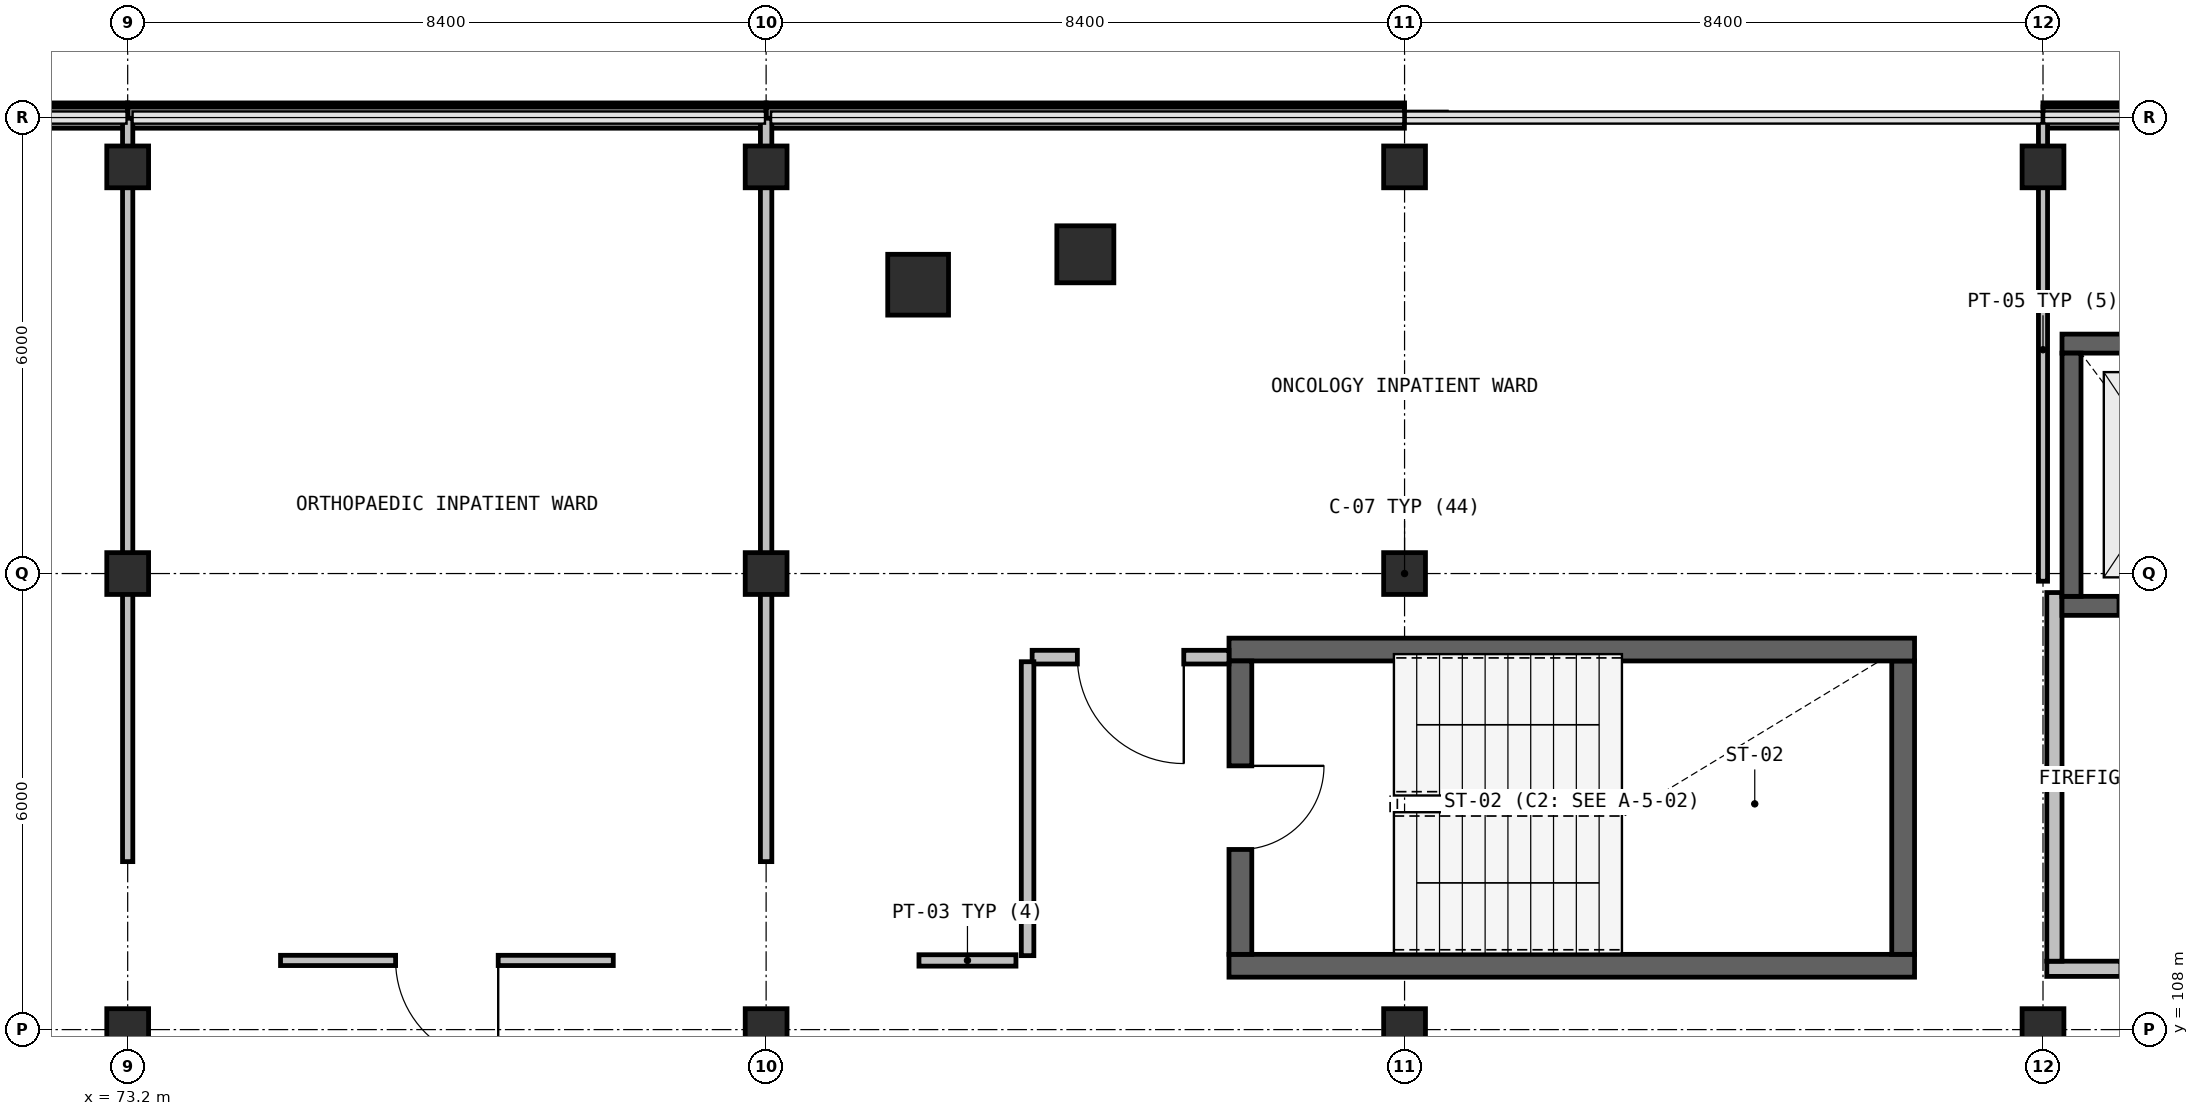
"""IFC4 building model, lengths in metres.
Left out: names, types, materials, properties, quantities, classifications, styles, units other than length and angle.
Written with IfcOpenShell. Run it as: python <this file> out.ifc"""

import sys

from ifc_helpers import new_model, si_unit, direction, frame, frame_2d, origin, origin_2d, place, context, subcontext, project, spatial, rectangle, extrude, element, fill, save


model = new_model("IFC4")
c1 = context("Model", 3, precision=1e-05, world=origin(), true_north=direction((0.0, 1.0)))
c2 = subcontext(c1, "Body", "Model", "MODEL_VIEW")
j1 = project(units=[si_unit("LENGTHUNIT", "METRE"), si_unit("PLANEANGLEUNIT", "RADIAN")], contexts=[c1])
p1 = place(None, origin())
s1 = spatial("IfcSite", under=j1, at=p1, CompositionType="ELEMENT")
p2 = place(p1, origin())
s2 = spatial("IfcBuilding", under=s1, at=p2, CompositionType="ELEMENT")
p3 = place(p2, frame((0.0, 0.0, 31.35)))
s3 = spatial("IfcBuildingStorey", under=s2, at=p3, CompositionType="ELEMENT", Elevation=31.35)
p4 = place(p3, frame((83.6, 117.8, 0.0), z_axis=(0.0, 0.0, 1.0), x_axis=(1.0, 0.0, 0.0)))
e1 = element("IfcColumn", 1, at=p4, inside=s3, PredefinedType="COLUMN", context=c2, shape_type="SweptSolid", body=[
    extrude(rectangle(XDim=0.8, YDim=0.8, at=origin_2d()), origin(), (0.0, 0.0, 1.0), 4.05),
])
p5 = place(p3, frame((85.8, 118.2, 0.0), z_axis=(0.0, 0.0, 1.0), x_axis=(1.0, 0.0, 0.0)))
e2 = element("IfcColumn", 2, at=p5, inside=s3, PredefinedType="COLUMN", context=c2, shape_type="SweptSolid", body=[
    extrude(rectangle(XDim=0.75, YDim=0.75, at=origin_2d()), origin(), (0.0, 0.0, 1.0), 4.05),
])
for number, where, z_axis, x_axis in (
    (3, (73.2, 108.0, 0.0), (0.0, 0.0, 1.0), (1.0, 0.0, 0.0)),
    (4, (73.2, 114.0, 0.0), (0.0, 0.0, 1.0), (1.0, 0.0, 0.0)),
    (5, (73.2, 119.35, 0.0), (0.0, 0.0, 1.0), (1.0, 0.0, 0.0)),
    (6, (81.6, 108.0, 0.0), (0.0, 0.0, 1.0), (1.0, 0.0, 0.0)),
    (7, (81.6, 114.0, 0.0), (0.0, 0.0, 1.0), (1.0, 0.0, 0.0)),
    (8, (81.6, 119.35, 0.0), (0.0, 0.0, 1.0), (1.0, 0.0, 0.0)),
    (9, (90.0, 108.0, 0.0), (0.0, 0.0, 1.0), (1.0, 0.0, 0.0)),
    (10, (90.0, 114.0, 0.0), (0.0, 0.0, 1.0), (1.0, 0.0, 0.0)),
    (11, (90.0, 119.35, 0.0), (0.0, 0.0, 1.0), (1.0, 0.0, 0.0)),
    (12, (98.4, 108.0, 0.0), (0.0, 0.0, 1.0), (1.0, 0.0, 0.0)),
    (13, (98.4, 119.35, 0.0), (0.0, 0.0, 1.0), (1.0, 0.0, 0.0)),
):
    element("IfcColumn", number, at=place(p3, frame(where, z_axis=z_axis, x_axis=x_axis)), inside=s3, PredefinedType="COLUMN", context=c2, shape_type="SweptSolid", body=[
        extrude(rectangle(XDim=0.55, YDim=0.55, at=origin_2d()), origin(), (0.0, 0.0, 1.0), 4.05),
    ])
for number, where, z_axis, x_axis in (
    (14, (64.802, 119.999, 0.0), (0.0, 0.0, 1.0), (1.0, 0.0, 0.0)),
    (15, (73.202, 119.999, 0.0), (0.0, 0.0, 1.0), (1.0, 0.0, 0.0)),
    (16, (81.602, 119.999, 0.0), (0.0, 0.0, 1.0), (1.0, 0.0, 0.0)),
):
    element("IfcWall", number, at=place(p3, frame(where, z_axis=z_axis, x_axis=x_axis)), inside=s3, PredefinedType="SOLIDWALL", context=c2, shape_type="SweptSolid", body=[
        extrude(rectangle(XDim=8.396, YDim=0.28, at=frame_2d((4.198, 0.0))), origin(), (0.0, 0.0, 1.0), 0.94),
    ])
p6 = place(p3, frame((98.401, 120.0, 0.0), z_axis=(0.0, 0.0, 1.0), x_axis=(1.0, 0.0, 0.0)))
e17 = element("IfcWall", 17, at=p6, inside=s3, PredefinedType="SOLIDWALL", context=c2, shape_type="SweptSolid", body=[
    extrude(rectangle(XDim=8.396, YDim=0.28, at=frame_2d((4.198, 0.0))), origin(), (0.0, 0.0, 1.0), 0.94),
])
p7 = place(p3, frame((87.69, 108.84, 0.0), z_axis=(0.0, 0.0, 1.0), x_axis=(1.0, 0.0, 0.0)))
e18 = element("IfcWall", 18, at=p7, inside=s3, PredefinedType="SHEAR", context=c2, shape_type="SweptSolid", body=[
    extrude(rectangle(XDim=9.02, YDim=0.3, at=frame_2d((4.51, 0.0))), origin(), (0.0, 0.0, 1.0), 3.785),
])
p8 = place(p3, frame((96.56, 108.99, 0.0), z_axis=(0.0, 0.0, 1.0), x_axis=(0.0, 1.0, 0.0)))
e19 = element("IfcWall", 19, at=p8, inside=s3, PredefinedType="SHEAR", context=c2, shape_type="SweptSolid", body=[
    extrude(rectangle(XDim=3.86, YDim=0.3, at=frame_2d((1.93, 0.0))), origin(), (0.0, 0.0, 1.0), 3.785),
])
p9 = place(p3, frame((96.71, 113.0, 0.0), z_axis=(0.0, 0.0, 1.0), x_axis=(-1.0, 0.0, 0.0)))
e20 = element("IfcWall", 20, at=p9, inside=s3, PredefinedType="SHEAR", context=c2, shape_type="SweptSolid", body=[
    extrude(rectangle(XDim=9.02, YDim=0.3, at=frame_2d((4.51, 0.0))), origin(), (0.0, 0.0, 1.0), 3.785),
])
p10 = place(p3, frame((87.84, 112.85, 0.0), z_axis=(0.0, 0.0, 1.0), x_axis=(0.0, -1.0, 0.0)))
e21 = element("IfcWall", 21, at=p10, inside=s3, PredefinedType="SHEAR", context=c2, shape_type="SweptSolid", body=[
    extrude(rectangle(XDim=3.86, YDim=0.3, at=frame_2d((1.93, 0.0))), origin(), (0.0, 0.0, 1.0), 3.785),
])
p11 = place(p10, frame((1.38, 0.0, 0.0)))
e22 = element("IfcOpeningElement", 22, at=p11, cuts=e21, PredefinedType="OPENING", context=c2, shape_type="SweptSolid", body=[
    extrude(rectangle(XDim=1.1, YDim=2.15, at=frame_2d((0.55, 1.075))), frame((0.0, 0.16, 0.0), z_axis=(0.0, -1.0, 0.0), x_axis=(1.0, 0.0, 0.0)), (0.0, 0.0, 1.0), 0.32),
])
p12 = place(p3, frame((98.45, 108.8, 0.0), z_axis=(0.0, 0.0, 1.0), x_axis=(1.0, 0.0, 0.0)))
e23 = element("IfcWall", 23, at=p12, inside=s3, PredefinedType="SOLIDWALL", context=c2, shape_type="SweptSolid", body=[
    extrude(rectangle(XDim=3.3, YDim=0.2, at=frame_2d((1.65, 0.0))), origin(), (0.0, 0.0, 1.0), 3.785),
])
p13 = place(p12, frame((0.975, 0.0, 0.0)))
e24 = element("IfcOpeningElement", 24, at=p13, cuts=e23, PredefinedType="OPENING", context=c2, shape_type="SweptSolid", body=[
    extrude(rectangle(XDim=1.15, YDim=2.15, at=frame_2d((0.575, 1.075))), frame((0.0, 0.11, 0.0), z_axis=(0.0, -1.0, 0.0), x_axis=(1.0, 0.0, 0.0)), (0.0, 0.0, 1.0), 0.22),
])
p14 = place(p3, frame((98.55, 113.75, 0.0), z_axis=(0.0, 0.0, 1.0), x_axis=(0.0, -1.0, 0.0)))
e25 = element("IfcWall", 25, at=p14, inside=s3, PredefinedType="SOLIDWALL", context=c2, shape_type="SweptSolid", body=[
    extrude(rectangle(XDim=4.85, YDim=0.2, at=frame_2d((2.425, 0.0))), origin(), (0.0, 0.0, 1.0), 3.185),
])
p15 = place(p3, frame((98.65, 113.575, 0.0), z_axis=(0.0, 0.0, 1.0), x_axis=(1.0, 0.0, 0.0)))
e26 = element("IfcWall", 26, at=p15, inside=s3, PredefinedType="SHEAR", context=c2, shape_type="SweptSolid", body=[
    extrude(rectangle(XDim=2.9, YDim=0.25, at=frame_2d((1.45, 0.0))), origin(), (0.0, 0.0, 1.0), 3.785),
])
p16 = place(p15, frame((0.75, 0.0, 0.0)))
e27 = element("IfcOpeningElement", 27, at=p16, cuts=e26, PredefinedType="OPENING", context=c2, shape_type="SweptSolid", body=[
    extrude(rectangle(XDim=1.4, YDim=2.15, at=frame_2d((0.7, 1.075))), frame((0.0, 0.135, 0.0), z_axis=(0.0, -1.0, 0.0), x_axis=(1.0, 0.0, 0.0)), (0.0, 0.0, 1.0), 0.27),
])
p17 = place(p3, frame((101.55, 117.025, 0.0), z_axis=(0.0, 0.0, 1.0), x_axis=(-1.0, 0.0, 0.0)))
e28 = element("IfcWall", 28, at=p17, inside=s3, PredefinedType="SHEAR", context=c2, shape_type="SweptSolid", body=[
    extrude(rectangle(XDim=2.9, YDim=0.25, at=frame_2d((1.45, 0.0))), origin(), (0.0, 0.0, 1.0), 3.785),
])
p18 = place(p3, frame((98.775, 116.9, 0.0), z_axis=(0.0, 0.0, 1.0), x_axis=(0.0, -1.0, 0.0)))
e29 = element("IfcWall", 29, at=p18, inside=s3, PredefinedType="SHEAR", context=c2, shape_type="SweptSolid", body=[
    extrude(rectangle(XDim=3.2, YDim=0.25, at=frame_2d((1.6, 0.0))), origin(), (0.0, 0.0, 1.0), 3.785),
])
p19 = place(p3, frame((73.2, 119.99, 0.0), z_axis=(0.0, 0.0, 1.0), x_axis=(0.0, -1.0, 0.0)))
e30 = element("IfcWall", 30, at=p19, inside=s3, PredefinedType="PARTITIONING", context=c2, shape_type="SweptSolid", body=[
    extrude(rectangle(XDim=9.78, YDim=0.135, at=frame_2d((4.89, 0.0))), origin(), (0.0, 0.0, 1.0), 3.185),
])
p20 = place(p3, frame((81.6, 119.99, 0.0), z_axis=(0.0, 0.0, 1.0), x_axis=(0.0, -1.0, 0.0)))
e31 = element("IfcWall", 31, at=p20, inside=s3, PredefinedType="PARTITIONING", context=c2, shape_type="SweptSolid", body=[
    extrude(rectangle(XDim=9.78, YDim=0.15, at=frame_2d((4.89, 0.0))), origin(), (0.0, 0.0, 1.0), 3.185),
])
p21 = place(p3, frame((79.589, 108.91, 0.0), z_axis=(0.0, 0.0, 1.0), x_axis=(-1.0, 0.0, 0.0)))
e32 = element("IfcWall", 32, at=p21, inside=s3, PredefinedType="PARTITIONING", context=c2, shape_type="SweptSolid", body=[
    extrude(rectangle(XDim=4.378, YDim=0.135, at=frame_2d((2.189, 0.0))), origin(), (0.0, 0.0, 1.0), 3.785),
])
p22 = place(p21, frame((1.514, 0.0, 0.0)))
e33 = element("IfcOpeningElement", 33, at=p22, cuts=e32, PredefinedType="OPENING", context=c2, shape_type="SweptSolid", body=[
    extrude(rectangle(XDim=1.35, YDim=2.15, at=frame_2d((0.675, 1.075))), frame((0.0, 0.077, 0.0), z_axis=(0.0, -1.0, 0.0), x_axis=(1.0, 0.0, 0.0)), (0.0, 0.0, 1.0), 0.155),
])
p23 = place(p3, frame((98.4, 119.99, 0.0), z_axis=(0.0, 0.0, 1.0), x_axis=(0.0, -1.0, 0.0)))
e34 = element("IfcWall", 34, at=p23, inside=s3, PredefinedType="PARTITIONING", context=c2, shape_type="SweptSolid", body=[
    extrude(rectangle(XDim=6.091, YDim=0.12, at=frame_2d((3.045, 0.0))), origin(), (0.0, 0.0, 1.0), 3.185),
])
p24 = place(p3, frame((87.69, 112.9, 0.0), z_axis=(0.0, 0.0, 1.0), x_axis=(-1.0, 0.0, 0.0)))
e35 = element("IfcWall", 35, at=p24, inside=s3, PredefinedType="PARTITIONING", context=c2, shape_type="SweptSolid", body=[
    extrude(rectangle(XDim=2.59, YDim=0.18, at=frame_2d((1.295, 0.0))), origin(), (0.0, 0.0, 1.0), 3.785),
])
p25 = place(p24, frame((0.595, 0.0, 0.0)))
e36 = element("IfcOpeningElement", 36, at=p25, cuts=e35, PredefinedType="OPENING", context=c2, shape_type="SweptSolid", body=[
    extrude(rectangle(XDim=1.4, YDim=2.15, at=frame_2d((0.7, 1.075))), frame((0.0, 0.1, 0.0), z_axis=(0.0, -1.0, 0.0), x_axis=(1.0, 0.0, 0.0)), (0.0, 0.0, 1.0), 0.2),
])
p26 = place(p3, frame((85.04, 112.84, 0.0), z_axis=(0.0, 0.0, 1.0), x_axis=(0.0, -1.0, 0.0)))
e37 = element("IfcWall", 37, at=p26, inside=s3, PredefinedType="PARTITIONING", context=c2, shape_type="SweptSolid", body=[
    extrude(rectangle(XDim=3.867, YDim=0.165, at=frame_2d((1.934, 0.0))), origin(), (0.0, 0.0, 1.0), 3.785),
])
p27 = place(p3, frame((84.887, 108.91, 0.0), z_axis=(0.0, 0.0, 1.0), x_axis=(-1.0, 0.0, 0.0)))
e38 = element("IfcWall", 38, at=p27, inside=s3, PredefinedType="PARTITIONING", context=c2, shape_type="SweptSolid", body=[
    extrude(rectangle(XDim=1.276, YDim=0.15, at=frame_2d((0.638, 0.0))), origin(), (0.0, 0.0, 1.0), 3.785),
])
p28 = place(p11, origin())
e39 = element("IfcDoor", 39, at=p28, inside=s3, OperationType="SINGLE_SWING_RIGHT", PredefinedType="DOOR", context=c2, shape_type="SweptSolid", body=[
    extrude(rectangle(XDim=1.1, YDim=2.15, at=frame_2d((0.55, 1.075))), frame((0.0, 0.025, 0.0), z_axis=(0.0, -1.0, 0.0), x_axis=(1.0, 0.0, 0.0)), (0.0, 0.0, 1.0), 0.05),
])
fill(e22, e39)
p29 = place(p22, origin())
e40 = element("IfcDoor", 40, at=p29, inside=s3, OperationType="SINGLE_SWING_RIGHT", PredefinedType="DOOR", context=c2, shape_type="SweptSolid", body=[
    extrude(rectangle(XDim=1.35, YDim=2.15, at=frame_2d((0.675, 1.075))), frame((0.0, 0.025, 0.0), z_axis=(0.0, -1.0, 0.0), x_axis=(1.0, 0.0, 0.0)), (0.0, 0.0, 1.0), 0.05),
])
fill(e33, e40)
p30 = place(p25, origin())
e41 = element("IfcDoor", 41, at=p30, inside=s3, OperationType="SINGLE_SWING_LEFT", PredefinedType="DOOR", context=c2, shape_type="SweptSolid", body=[
    extrude(rectangle(XDim=1.4, YDim=2.15, at=frame_2d((0.7, 1.075))), frame((0.0, 0.025, 0.0), z_axis=(0.0, -1.0, 0.0), x_axis=(1.0, 0.0, 0.0)), (0.0, 0.0, 1.0), 0.05),
])
fill(e36, e41)
save(model, sys.argv[1])
